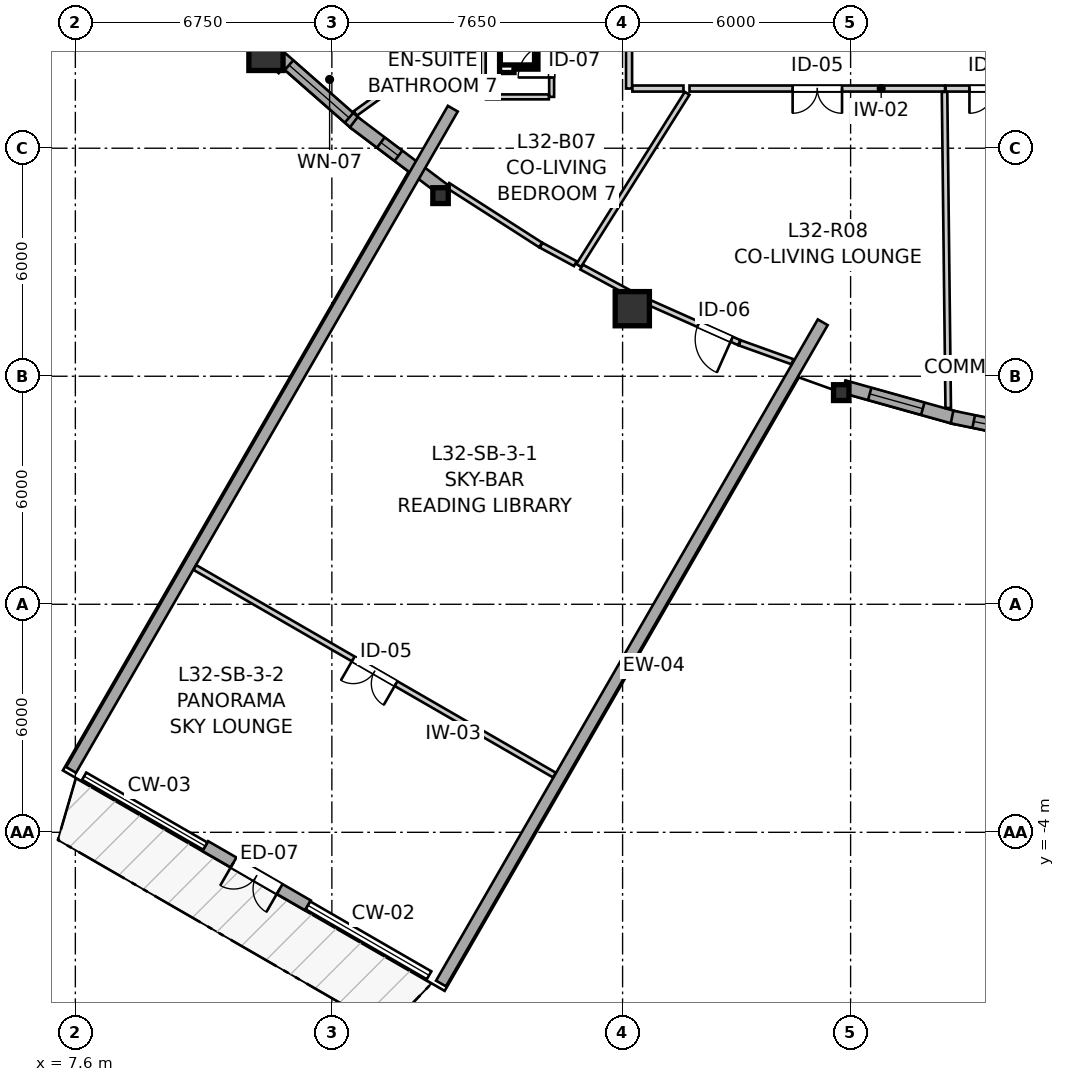
"""IFC4 building model, lengths in metres.
Left out: names, types, materials, properties, quantities, classifications, styles, units other than length and angle.
Written with IfcOpenShell. Run it as: python <this file> out.ifc"""

import sys

from ifc_helpers import new_model, si_unit, direction, frame, frame_2d, origin, origin_2d, place, context, subcontext, project, spatial, rectangle, i_section, extrude, source, transform, mapped, element, fill, save


model = new_model("IFC4")
c1 = context("Model", 3, precision=1e-05, world=origin(), true_north=direction((0.0, 1.0)))
c2 = subcontext(c1, "Body", "Model", "MODEL_VIEW")
j1 = project(units=[si_unit("LENGTHUNIT", "METRE"), si_unit("PLANEANGLEUNIT", "RADIAN")], contexts=[c1])
p1 = place(None, origin())
s1 = spatial("IfcSite", under=j1, at=p1, CompositionType="ELEMENT")
p2 = place(p1, origin())
s2 = spatial("IfcBuilding", under=s1, at=p2, CompositionType="ELEMENT")
p3 = place(p2, frame((0.0, 0.0, 108.8)))
s3 = spatial("IfcBuildingStorey", under=s2, at=p3, CompositionType="ELEMENT", Elevation=108.8)
m1 = source(origin(), c2, "Body", "SweptSolid", [
    extrude(rectangle(XDim=0.9, YDim=0.9, at=origin_2d()), origin(), (0.0, 0.0, 1.0), 2.935),
])
p4 = place(p3, frame((12.616, 16.495, 0.0), z_axis=(0.0, 0.0, 1.0), x_axis=(1.0, 0.0, 0.0)))
e1 = element("IfcColumn", 1, at=p4, inside=s3, PredefinedType="COLUMN", context=c2, shape_type="MappedRepresentation", body=[
    mapped(m1, transform((0.0, 0.0, 0.0), x_axis=(1.0, 0.0, 0.0), y_axis=(0.0, 1.0, 0.0), z_axis=(0.0, 0.0, 1.0), scale=1.0)),
])
m2 = source(origin(), c2, "Body", "SweptSolid", [
    extrude(i_section(OverallWidth=0.406, OverallDepth=0.416, WebThickness=0.027, FlangeThickness=0.044, FilletRadius=0.015, at=origin_2d()), origin(), (0.0, 0.0, 1.0), 2.935),
])
p5 = place(p3, frame((17.209, 12.753, 0.0), z_axis=(0.0, 0.0, 1.0), x_axis=(1.0, 0.0, 0.0)))
e2 = element("IfcColumn", 2, at=p5, inside=s3, PredefinedType="PILASTER", context=c2, shape_type="MappedRepresentation", body=[
    mapped(m2, transform((0.0, 0.0, 0.0), x_axis=(1.0, 0.0, 0.0), y_axis=(0.0, 1.0, 0.0), z_axis=(0.0, 0.0, 1.0), scale=1.0)),
])
p6 = place(p3, frame((22.256, 9.778, 0.0), z_axis=(0.0, 0.0, 1.0), x_axis=(1.0, 0.0, 0.0)))
e3 = element("IfcColumn", 3, at=p6, inside=s3, PredefinedType="COLUMN", context=c2, shape_type="MappedRepresentation", body=[
    mapped(m1, transform((0.0, 0.0, 0.0), x_axis=(1.0, 0.0, 0.0), y_axis=(0.0, 1.0, 0.0), z_axis=(0.0, 0.0, 1.0), scale=1.0)),
])
p7 = place(p3, frame((27.754, 7.569, 0.0), z_axis=(0.0, 0.0, 1.0), x_axis=(1.0, 0.0, 0.0)))
e4 = element("IfcColumn", 4, at=p7, inside=s3, PredefinedType="PILASTER", context=c2, shape_type="MappedRepresentation", body=[
    mapped(m2, transform((0.0, 0.0, 0.0), x_axis=(1.0, 0.0, 0.0), y_axis=(0.0, 1.0, 0.0), z_axis=(0.0, 0.0, 1.0), scale=1.0)),
])
p8 = place(p3, frame((12.901, 16.471, 0.0), z_axis=(0.0, 0.0, 1.0), x_axis=(0.751480442913, -0.659755366722, 0.0)))
e5 = element("IfcWall", 5, at=p8, inside=s3, PredefinedType="SOLIDWALL", context=c2, shape_type="SweptSolid", body=[
    extrude(rectangle(XDim=2.789, YDim=0.34, at=frame_2d((1.395, 0.0))), origin(), (0.0, 0.0, 1.0), 2.465),
])
p9 = place(p8, frame((0.43, 0.0, 0.82)))
e6 = element("IfcOpeningElement", 6, at=p9, cuts=e5, PredefinedType="OPENING", context=c2, shape_type="SweptSolid", body=[
    extrude(rectangle(XDim=2.1, YDim=1.4, at=frame_2d((1.05, 0.7))), frame((0.0, 0.18, 0.0), z_axis=(0.0, -1.0, 0.0), x_axis=(1.0, 0.0, 0.0)), (0.0, 0.0, 1.0), 0.36),
])
p10 = place(p3, frame((14.928, 14.686, 0.0), z_axis=(0.0, 0.0, 1.0), x_axis=(0.798387010211, -0.602144651995, 0.0)))
e7 = element("IfcWall", 7, at=p10, inside=s3, PredefinedType="SOLIDWALL", context=c2, shape_type="SweptSolid", body=[
    extrude(rectangle(XDim=2.966, YDim=0.34, at=frame_2d((1.483, 0.0))), origin(), (0.0, 0.0, 1.0), 2.465),
])
p11 = place(p10, frame((0.891, 0.0, 0.82)))
e8 = element("IfcOpeningElement", 8, at=p11, cuts=e7, PredefinedType="OPENING", context=c2, shape_type="SweptSolid", body=[
    extrude(rectangle(XDim=0.58, YDim=1.35, at=frame_2d((0.29, 0.675))), frame((0.0, 0.18, 0.0), z_axis=(0.0, -1.0, 0.0), x_axis=(1.0, 0.0, 0.0)), (0.0, 0.0, 1.0), 0.36),
])
p12 = place(p3, frame((27.819, 7.728, 0.0), z_axis=(0.0, 0.0, 1.0), x_axis=(0.963032186905, -0.269386352632, 0.0)))
e9 = element("IfcWall", 9, at=p12, inside=s3, PredefinedType="SOLIDWALL", context=c2, shape_type="SweptSolid", body=[
    extrude(rectangle(XDim=3.049, YDim=0.34, at=frame_2d((1.524, 0.0))), origin(), (0.0, 0.0, 1.0), 2.465),
])
p13 = place(p12, frame((0.71, 0.0, 0.82)))
e10 = element("IfcOpeningElement", 10, at=p13, cuts=e9, PredefinedType="OPENING", context=c2, shape_type="SweptSolid", body=[
    extrude(rectangle(XDim=1.45, YDim=1.25, at=frame_2d((0.725, 0.625))), frame((0.0, 0.18, 0.0), z_axis=(0.0, -1.0, 0.0), x_axis=(1.0, 0.0, 0.0)), (0.0, 0.0, 1.0), 0.36),
])
p14 = place(p3, frame((30.67, 6.927, 0.0), z_axis=(0.0, 0.0, 1.0), x_axis=(0.979422345081, -0.201821381317, 0.0)))
e11 = element("IfcWall", 11, at=p14, inside=s3, PredefinedType="SOLIDWALL", context=c2, shape_type="SweptSolid", body=[
    extrude(rectangle(XDim=2.903, YDim=0.34, at=frame_2d((1.452, 0.0))), origin(), (0.0, 0.0, 1.0), 2.465),
])
p15 = place(p14, frame((0.582, 0.0, 0.82)))
e12 = element("IfcOpeningElement", 12, at=p15, cuts=e11, PredefinedType="OPENING", context=c2, shape_type="SweptSolid", body=[
    extrude(rectangle(XDim=1.75, YDim=1.3, at=frame_2d((0.875, 0.65))), frame((0.0, 0.18, 0.0), z_axis=(0.0, -1.0, 0.0), x_axis=(1.0, 0.0, 0.0)), (0.0, 0.0, 1.0), 0.36),
])
p16 = place(p3, frame((27.267, 9.42, 0.0), z_axis=(0.0, 0.0, 1.0), x_axis=(-0.500001212782, -0.866024703583, 0.0)))
e13 = element("IfcWall", 13, at=p16, inside=s3, PredefinedType="SOLIDWALL", context=c2, shape_type="SweptSolid", body=[
    extrude(rectangle(XDim=20.09, YDim=0.3, at=frame_2d((10.045, 0.0))), origin(), (0.0, 0.0, 1.0), 2.115),
])
p17 = place(p3, frame((17.533, 15.04, 0.0), z_axis=(0.0, 0.0, 1.0), x_axis=(-0.499995950774, -0.866027741594, 0.0)))
e14 = element("IfcWall", 14, at=p17, inside=s3, PredefinedType="SOLIDWALL", context=c2, shape_type="SweptSolid", body=[
    extrude(rectangle(XDim=20.091, YDim=0.3, at=frame_2d((10.045, 0.0))), origin(), (0.0, 0.0, 1.0), 2.115),
])
p18 = place(p3, frame((13.721, -5.923, 0.0), z_axis=(0.0, 0.0, 1.0), x_axis=(-0.866009661879, 0.500027264788, 0.0)))
e15 = element("IfcWall", 15, at=p18, inside=s3, PredefinedType="SOLIDWALL", context=c2, shape_type="SweptSolid", body=[
    extrude(rectangle(XDim=3.12, YDim=0.3, at=frame_2d((1.56, 0.0))), origin(), (0.0, 0.0, 1.0), 2.3),
])
p19 = place(p18, frame((0.86, 0.0, 0.0)))
e16 = element("IfcOpeningElement", 16, at=p19, cuts=e15, PredefinedType="OPENING", context=c2, shape_type="SweptSolid", body=[
    extrude(rectangle(XDim=1.4, YDim=2.15, at=frame_2d((0.7, 1.075))), frame((0.0, 0.16, 0.0), z_axis=(0.0, -1.0, 0.0), x_axis=(1.0, 0.0, 0.0)), (0.0, 0.0, 1.0), 0.32),
])
p20 = place(p3, frame((20.206, -2.494, 0.0), z_axis=(0.0, 0.0, 1.0), x_axis=(-0.866034115916, 0.499984909842, 0.0)))
e17 = element("IfcWall", 17, at=p20, inside=s3, PredefinedType="PARTITIONING", context=c2, shape_type="SweptSolid", body=[
    extrude(rectangle(XDim=10.924, YDim=0.145, at=frame_2d((5.462, 0.0))), origin(), (0.0, 0.0, 1.0), 2.353),
])
p21 = place(p20, frame((4.812, 0.0, 0.0)))
e18 = element("IfcOpeningElement", 18, at=p21, cuts=e17, PredefinedType="OPENING", context=c2, shape_type="SweptSolid", body=[
    extrude(rectangle(XDim=1.3, YDim=2.1, at=frame_2d((0.65, 1.05))), frame((0.0, 0.083, 0.0), z_axis=(0.0, -1.0, 0.0), x_axis=(1.0, 0.0, 0.0)), (0.0, 0.0, 1.0), 0.165),
])
p22 = place(p3, frame((30.486, 15.57, 0.0), z_axis=(0.0, 0.0, 1.0), x_axis=(-1.0, 0.0, 0.0)))
e19 = element("IfcWall", 19, at=p22, inside=s3, PredefinedType="PARTITIONING", context=c2, shape_type="SweptSolid", body=[
    extrude(rectangle(XDim=6.725, YDim=0.16, at=frame_2d((3.363, 0.0))), origin(), (0.0, 0.0, 1.0), 2.935),
])
p23 = place(p22, frame((2.711, 0.0, 0.0)))
e20 = element("IfcOpeningElement", 20, at=p23, cuts=e19, PredefinedType="OPENING", context=c2, shape_type="SweptSolid", body=[
    extrude(rectangle(XDim=1.3, YDim=2.1, at=frame_2d((0.65, 1.05))), frame((0.0, 0.09, 0.0), z_axis=(0.0, -1.0, 0.0), x_axis=(1.0, 0.0, 0.0)), (0.0, 0.0, 1.0), 0.18),
])
p24 = place(p3, frame((22.17, 15.57, 0.0), z_axis=(0.0, 0.0, 1.0), x_axis=(0.0, 1.0, 0.0)))
e21 = element("IfcWall", 21, at=p24, inside=s3, PredefinedType="PARTITIONING", context=c2, shape_type="SweptSolid", body=[
    extrude(rectangle(XDim=4.555, YDim=0.16, at=frame_2d((2.277, 0.0))), origin(), (0.0, 0.0, 1.0), 2.935),
])
p25 = place(p24, frame((1.808, 0.0, 0.0)))
e22 = element("IfcOpeningElement", 22, at=p25, cuts=e21, PredefinedType="OPENING", context=c2, shape_type="SweptSolid", body=[
    extrude(rectangle(XDim=0.92, YDim=2.1, at=frame_2d((0.46, 1.05))), frame((0.0, 0.09, 0.0), z_axis=(0.0, -1.0, 0.0), x_axis=(1.0, 0.0, 0.0)), (0.0, 0.0, 1.0), 0.18),
])
p26 = place(p3, frame((25.071, 8.884, 0.0), z_axis=(0.0, 0.0, 1.0), x_axis=(-0.913404708383, 0.407052623997, 0.0)))
e23 = element("IfcWall", 23, at=p26, inside=s3, PredefinedType="PARTITIONING", context=c2, shape_type="SweptSolid", body=[
    extrude(rectangle(XDim=2.923, YDim=0.145, at=frame_2d((1.462, 0.0))), origin(), (0.0, 0.0, 1.0), 2.453),
])
p27 = place(p26, frame((0.22, 0.0, 0.0)))
e24 = element("IfcOpeningElement", 24, at=p27, cuts=e23, PredefinedType="OPENING", context=c2, shape_type="SweptSolid", body=[
    extrude(rectangle(XDim=0.96, YDim=2.1, at=frame_2d((0.48, 1.05))), frame((0.0, 0.083, 0.0), z_axis=(0.0, -1.0, 0.0), x_axis=(1.0, 0.0, 0.0)), (0.0, 0.0, 1.0), 0.165),
])
p28 = place(p3, frame((33.099, 15.57, 0.0), z_axis=(0.0, 0.0, 1.0), x_axis=(-1.0, 0.0, 0.0)))
e25 = element("IfcWall", 25, at=p28, inside=s3, PredefinedType="PARTITIONING", context=c2, shape_type="SweptSolid", body=[
    extrude(rectangle(XDim=2.598, YDim=0.16, at=frame_2d((1.299, 0.0))), origin(), (0.0, 0.0, 1.0), 2.935),
])
p29 = place(p28, frame((0.671, 0.0, 0.0)))
e26 = element("IfcOpeningElement", 26, at=p29, cuts=e25, PredefinedType="OPENING", context=c2, shape_type="SweptSolid", body=[
    extrude(rectangle(XDim=1.3, YDim=2.1, at=frame_2d((0.65, 1.05))), frame((0.0, 0.09, 0.0), z_axis=(0.0, -1.0, 0.0), x_axis=(1.0, 0.0, 0.0)), (0.0, 0.0, 1.0), 0.18),
])
p30 = place(p3, frame((20.133, 15.351, 0.0), z_axis=(0.0, 0.0, 1.0), x_axis=(0.0, 1.0, 0.0)))
e27 = element("IfcWall", 27, at=p30, inside=s3, PredefinedType="PARTITIONING", context=c2, shape_type="SweptSolid", body=[
    extrude(rectangle(XDim=1.9, YDim=0.13, at=frame_2d((0.95, 0.0))), origin(), (0.0, 0.0, 1.0), 2.935),
])
p31 = place(p30, frame((0.51, 0.0, 0.0)))
e28 = element("IfcOpeningElement", 28, at=p31, cuts=e27, PredefinedType="OPENING", context=c2, shape_type="SweptSolid", body=[
    extrude(rectangle(XDim=0.88, YDim=2.05, at=frame_2d((0.44, 1.025))), frame((0.0, 0.075, 0.0), z_axis=(0.0, -1.0, 0.0), x_axis=(1.0, 0.0, 0.0)), (0.0, 0.0, 1.0), 0.15),
])
p32 = place(p3, frame((14.966, 14.915, 0.0), z_axis=(0.0, 0.0, 1.0), x_axis=(0.811310715309, 0.584615192434, 0.0)))
e29 = element("IfcWall", 29, at=p32, inside=s3, PredefinedType="PARTITIONING", context=c2, shape_type="SweptSolid", body=[
    extrude(rectangle(XDim=8.72, YDim=0.145, at=frame_2d((4.36, 0.0))), origin(), (0.0, 0.0, 1.0), 2.103),
])
p33 = place(p3, frame((30.472, 15.481, 0.0), z_axis=(0.0, 0.0, 1.0), x_axis=(0.011623708307, -0.999932442421, 0.0)))
e30 = element("IfcWall", 30, at=p33, inside=s3, PredefinedType="PARTITIONING", context=c2, shape_type="SweptSolid", body=[
    extrude(rectangle(XDim=8.317, YDim=0.145, at=frame_2d((4.159, 0.0))), origin(), (0.0, 0.0, 1.0), 2.935),
])
p34 = place(p3, frame((20.845, 10.914, 0.0), z_axis=(0.0, 0.0, 1.0), x_axis=(0.533007953382, 0.846110230189, 0.0)))
e31 = element("IfcWall", 31, at=p34, inside=s3, PredefinedType="PARTITIONING", context=c2, shape_type="SweptSolid", body=[
    extrude(rectangle(XDim=5.354, YDim=0.145, at=frame_2d((2.677, 0.0))), origin(), (0.0, 0.0, 1.0), 2.935),
])
p35 = place(p3, frame((17.398, 13.024, 0.0), z_axis=(0.0, 0.0, 1.0), x_axis=(0.841590343852, -0.540116369994, 0.0)))
e32 = element("IfcWall", 32, at=p35, inside=s3, PredefinedType="PARTITIONING", context=c2, shape_type="SweptSolid", body=[
    extrude(rectangle(XDim=2.906, YDim=0.145, at=frame_2d((1.453, 0.0))), origin(), (0.0, 0.0, 1.0), 2.453),
])
p36 = place(p3, frame((18.333, 15.351, 0.0), z_axis=(0.0, 0.0, 1.0), x_axis=(0.0, 1.0, 0.0)))
e33 = element("IfcWall", 33, at=p36, inside=s3, PredefinedType="PARTITIONING", context=c2, shape_type="SweptSolid", body=[
    extrude(rectangle(XDim=1.756, YDim=0.13, at=frame_2d((0.878, 0.0))), origin(), (0.0, 0.0, 1.0), 2.935),
])
p37 = place(p3, frame((18.406, 15.351, 0.0), z_axis=(0.0, 0.0, 1.0), x_axis=(1.0, 0.0, 0.0)))
e34 = element("IfcWall", 34, at=p37, inside=s3, PredefinedType="PARTITIONING", context=c2, shape_type="SweptSolid", body=[
    extrude(rectangle(XDim=1.654, YDim=0.13, at=frame_2d((0.827, 0.0))), origin(), (0.0, 0.0, 1.0), 2.935),
])
p38 = place(p3, frame((20.92, 10.873, 0.0), z_axis=(0.0, 0.0, 1.0), x_axis=(0.879929881444, -0.475103571595, 0.0)))
e35 = element("IfcWall", 35, at=p38, inside=s3, PredefinedType="PARTITIONING", context=c2, shape_type="SweptSolid", body=[
    extrude(rectangle(XDim=1.667, YDim=0.145, at=frame_2d((0.834, 0.0))), origin(), (0.0, 0.0, 1.0), 2.453),
])
p39 = place(p3, frame((22.258, 15.57, 0.0), z_axis=(0.0, 0.0, 1.0), x_axis=(1.0, 0.0, 0.0)))
e36 = element("IfcWall", 36, at=p39, inside=s3, PredefinedType="PARTITIONING", context=c2, shape_type="SweptSolid", body=[
    extrude(rectangle(XDim=1.344, YDim=0.16, at=frame_2d((0.672, 0.0))), origin(), (0.0, 0.0, 1.0), 2.935),
])
p40 = place(p3, frame((25.085, 8.879, 0.0), z_axis=(0.0, 0.0, 1.0), x_axis=(0.941166260093, -0.337943887151, 0.0)))
e37 = element("IfcWall", 37, at=p40, inside=s3, PredefinedType="PARTITIONING", context=c2, shape_type="SweptSolid", body=[
    extrude(rectangle(XDim=1.472, YDim=0.145, at=frame_2d((0.736, 0.0))), origin(), (0.0, 0.0, 1.0), 2.453),
])
p41 = place(p3, frame((19.857, 11.447, 0.0), z_axis=(0.0, 0.0, 1.0), x_axis=(0.8800411893, -0.474897362738, 0.0)))
e38 = element("IfcWall", 38, at=p41, inside=s3, PredefinedType="PARTITIONING", context=c2, shape_type="SweptSolid", body=[
    extrude(rectangle(XDim=1.022, YDim=0.145, at=frame_2d((0.511, 0.0))), origin(), (0.0, 0.0, 1.0), 2.453),
])
m3 = source(origin(), c2, "Body", "SweptSolid", [
    extrude(rectangle(XDim=2.1, YDim=1.4, at=frame_2d((1.05, 0.7))), frame((0.0, 0.03, 0.0), z_axis=(0.0, -1.0, 0.0), x_axis=(1.0, 0.0, 0.0)), (0.0, 0.0, 1.0), 0.06),
])
p42 = place(p9, origin())
e39 = element("IfcWindow", 39, at=p42, inside=s3, PartitioningType="SINGLE_PANEL", PredefinedType="WINDOW", context=c2, shape_type="MappedRepresentation", body=[
    mapped(m3, transform((0.0, 0.0, 0.0), x_axis=(1.0, 0.0, 0.0), y_axis=(0.0, 1.0, 0.0), z_axis=(0.0, 0.0, 1.0), scale=1.0)),
])
fill(e6, e39)
m4 = source(origin(), c2, "Body", "SweptSolid", [
    extrude(rectangle(XDim=1.45, YDim=1.25, at=frame_2d((0.725, 0.625))), frame((0.0, 0.03, 0.0), z_axis=(0.0, -1.0, 0.0), x_axis=(1.0, 0.0, 0.0)), (0.0, 0.0, 1.0), 0.06),
])
p43 = place(p13, origin())
e40 = element("IfcWindow", 40, at=p43, inside=s3, PartitioningType="SINGLE_PANEL", PredefinedType="WINDOW", context=c2, shape_type="MappedRepresentation", body=[
    mapped(m4, transform((0.0, 0.0, 0.0), x_axis=(1.0, 0.0, 0.0), y_axis=(0.0, 1.0, 0.0), z_axis=(0.0, 0.0, 1.0), scale=1.0)),
])
fill(e10, e40)
m5 = source(origin(), c2, "Body", "SweptSolid", [
    extrude(rectangle(XDim=1.75, YDim=1.3, at=frame_2d((0.875, 0.65))), frame((0.0, 0.03, 0.0), z_axis=(0.0, -1.0, 0.0), x_axis=(1.0, 0.0, 0.0)), (0.0, 0.0, 1.0), 0.06),
])
p44 = place(p15, origin())
e41 = element("IfcWindow", 41, at=p44, inside=s3, PartitioningType="SINGLE_PANEL", PredefinedType="WINDOW", context=c2, shape_type="MappedRepresentation", body=[
    mapped(m5, transform((0.0, 0.0, 0.0), x_axis=(1.0, 0.0, 0.0), y_axis=(0.0, 1.0, 0.0), z_axis=(0.0, 0.0, 1.0), scale=1.0)),
])
fill(e12, e41)
m6 = source(origin(), c2, "Body", "SweptSolid", [
    extrude(rectangle(XDim=0.58, YDim=1.35, at=frame_2d((0.29, 0.675))), frame((0.0, 0.03, 0.0), z_axis=(0.0, -1.0, 0.0), x_axis=(1.0, 0.0, 0.0)), (0.0, 0.0, 1.0), 0.06),
])
p45 = place(p11, origin())
e42 = element("IfcWindow", 42, at=p45, inside=s3, PartitioningType="SINGLE_PANEL", PredefinedType="WINDOW", context=c2, shape_type="MappedRepresentation", body=[
    mapped(m6, transform((0.0, 0.0, 0.0), x_axis=(1.0, 0.0, 0.0), y_axis=(0.0, 1.0, 0.0), z_axis=(0.0, 0.0, 1.0), scale=1.0)),
])
fill(e8, e42)
m7 = source(origin(), c2, "Body", "SweptSolid", [
    extrude(rectangle(XDim=1.4, YDim=2.15, at=frame_2d((0.7, 1.075))), frame((0.0, 0.025, 0.0), z_axis=(0.0, -1.0, 0.0), x_axis=(1.0, 0.0, 0.0)), (0.0, 0.0, 1.0), 0.05),
])
p46 = place(p19, origin())
e43 = element("IfcDoor", 43, at=p46, inside=s3, OperationType="DOUBLE_DOOR_SINGLE_SWING", PredefinedType="DOOR", context=c2, shape_type="MappedRepresentation", body=[
    mapped(m7, transform((0.0, 0.0, 0.0), x_axis=(1.0, 0.0, 0.0), y_axis=(0.0, 1.0, 0.0), z_axis=(0.0, 0.0, 1.0), scale=1.0)),
])
fill(e16, e43)
m8 = source(origin(), c2, "Body", "SweptSolid", [
    extrude(rectangle(XDim=1.3, YDim=2.1, at=frame_2d((0.65, 1.05))), frame((0.0, 0.025, 0.0), z_axis=(0.0, -1.0, 0.0), x_axis=(1.0, 0.0, 0.0)), (0.0, 0.0, 1.0), 0.05),
])
p47 = place(p21, origin())
e44 = element("IfcDoor", 44, at=p47, inside=s3, OperationType="DOUBLE_DOOR_SINGLE_SWING", PredefinedType="DOOR", context=c2, shape_type="MappedRepresentation", body=[
    mapped(m8, transform((0.0, 0.0, 0.0), x_axis=(1.0, 0.0, 0.0), y_axis=(0.0, 1.0, 0.0), z_axis=(0.0, 0.0, 1.0), scale=1.0)),
])
fill(e18, e44)
p48 = place(p23, origin())
e45 = element("IfcDoor", 45, at=p48, inside=s3, OperationType="DOUBLE_DOOR_SINGLE_SWING", PredefinedType="DOOR", context=c2, shape_type="MappedRepresentation", body=[
    mapped(m8, transform((0.0, 0.0, 0.0), x_axis=(1.0, 0.0, 0.0), y_axis=(0.0, 1.0, 0.0), z_axis=(0.0, 0.0, 1.0), scale=1.0)),
])
fill(e20, e45)
m9 = source(origin(), c2, "Body", "SweptSolid", [
    extrude(rectangle(XDim=0.96, YDim=2.1, at=frame_2d((0.48, 1.05))), frame((0.0, 0.025, 0.0), z_axis=(0.0, -1.0, 0.0), x_axis=(1.0, 0.0, 0.0)), (0.0, 0.0, 1.0), 0.05),
])
p49 = place(p27, origin())
e46 = element("IfcDoor", 46, at=p49, inside=s3, OperationType="SINGLE_SWING_LEFT", PredefinedType="DOOR", context=c2, shape_type="MappedRepresentation", body=[
    mapped(m9, transform((0.0, 0.0, 0.0), x_axis=(1.0, 0.0, 0.0), y_axis=(0.0, 1.0, 0.0), z_axis=(0.0, 0.0, 1.0), scale=1.0)),
])
fill(e24, e46)
p50 = place(p29, origin())
e47 = element("IfcDoor", 47, at=p50, inside=s3, OperationType="DOUBLE_DOOR_SINGLE_SWING", PredefinedType="DOOR", context=c2, shape_type="MappedRepresentation", body=[
    mapped(m8, transform((0.0, 0.0, 0.0), x_axis=(1.0, 0.0, 0.0), y_axis=(0.0, 1.0, 0.0), z_axis=(0.0, 0.0, 1.0), scale=1.0)),
])
fill(e26, e47)
m10 = source(origin(), c2, "Body", "SweptSolid", [
    extrude(rectangle(XDim=0.88, YDim=2.05, at=frame_2d((0.44, 1.025))), frame((0.0, 0.025, 0.0), z_axis=(0.0, -1.0, 0.0), x_axis=(1.0, 0.0, 0.0)), (0.0, 0.0, 1.0), 0.05),
])
p51 = place(p31, origin())
e48 = element("IfcDoor", 48, at=p51, inside=s3, OperationType="SINGLE_SWING_LEFT", PredefinedType="DOOR", context=c2, shape_type="MappedRepresentation", body=[
    mapped(m10, transform((0.0, 0.0, 0.0), x_axis=(1.0, 0.0, 0.0), y_axis=(0.0, 1.0, 0.0), z_axis=(0.0, 0.0, 1.0), scale=1.0)),
])
fill(e28, e48)
save(model, sys.argv[1])
